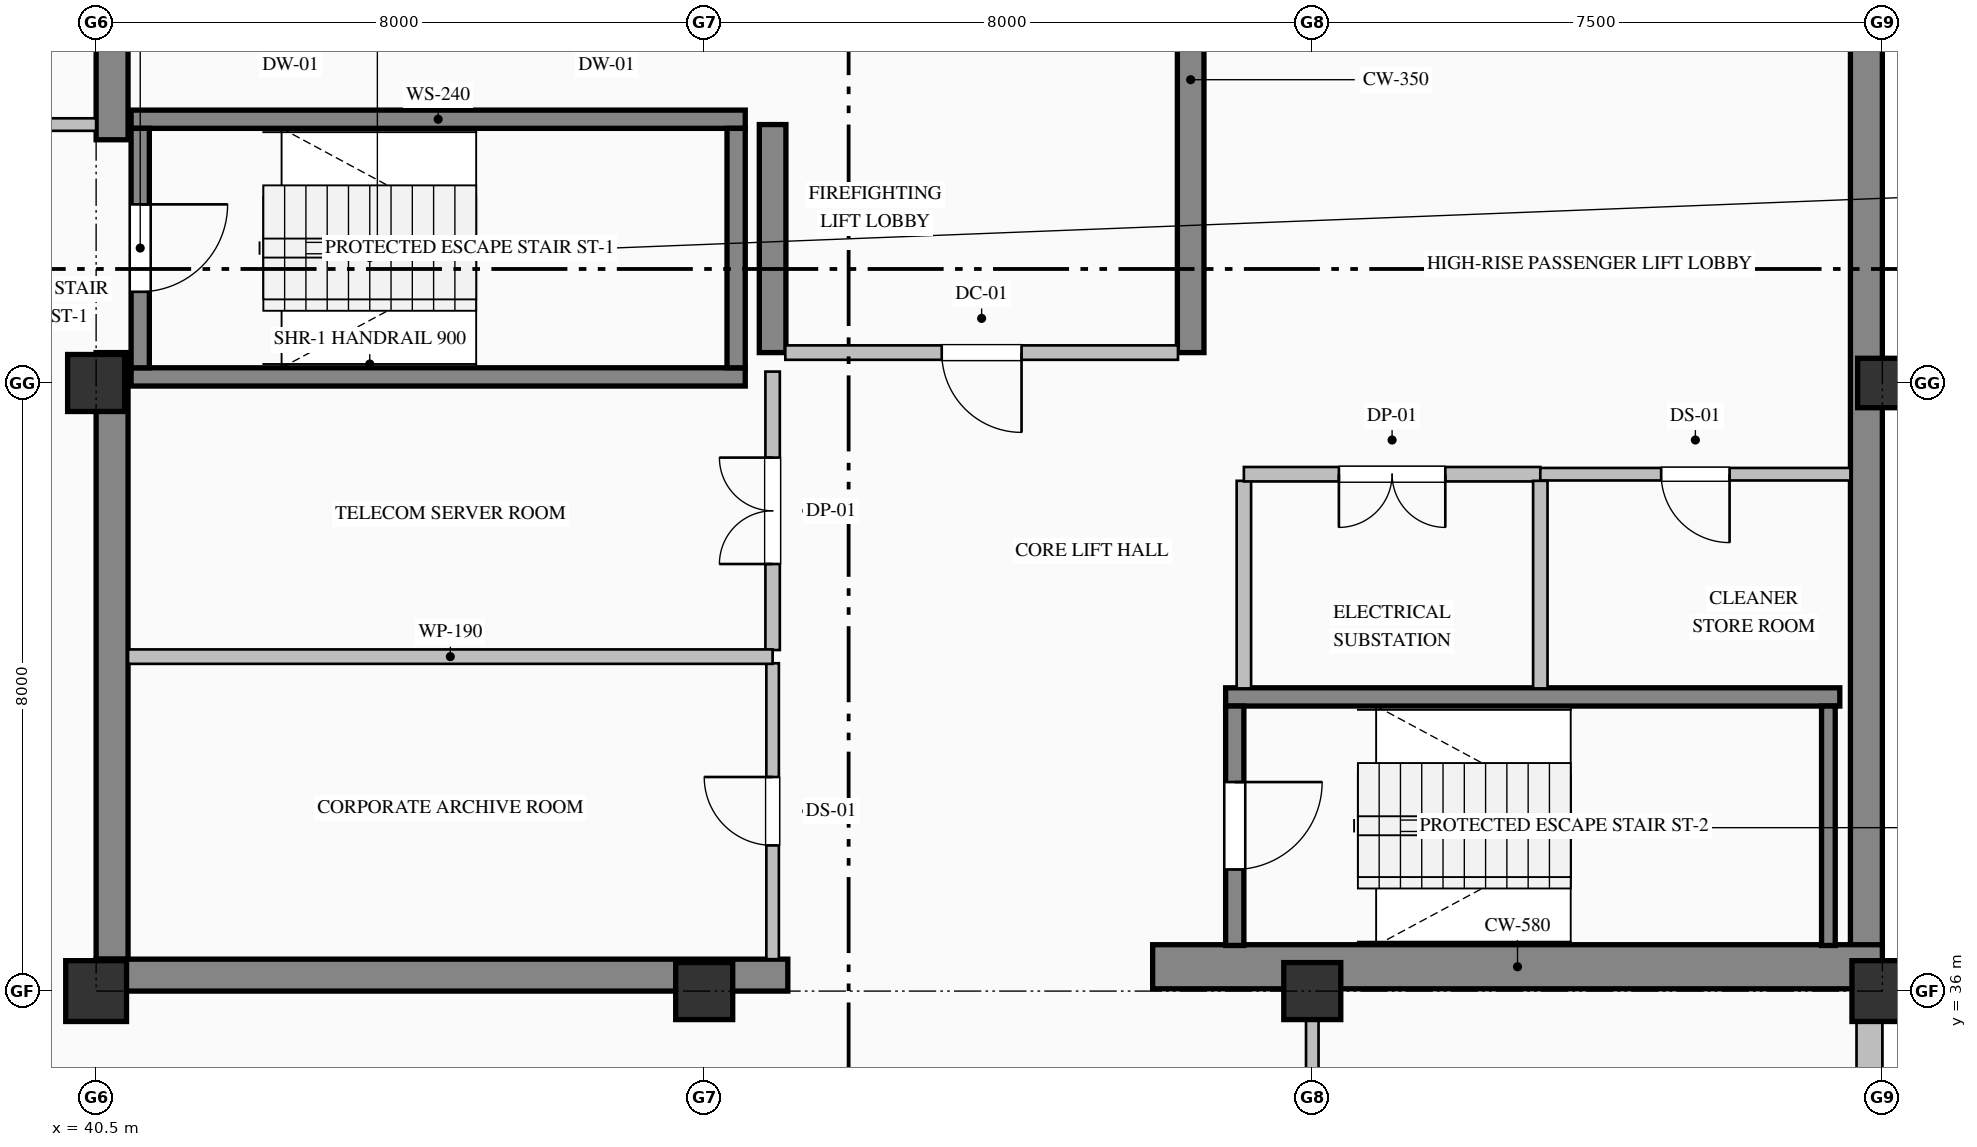
"""IFC4 building model, lengths in metres.
Left out: names, types, materials, properties, quantities, classifications, styles, units other than length and angle.
Written with IfcOpenShell. Run it as: python <this file> out.ifc"""

import sys

from ifc_helpers import new_model, si_unit, direction, frame, frame_2d, origin, origin_2d, place, context, subcontext, project, spatial, rectangle, hollow_rectangle, extrude, element, fill, save


model = new_model("IFC4")
c1 = context("Model", 3, precision=1e-05, world=origin(), true_north=direction((0.0, 1.0)))
c2 = subcontext(c1, "Body", "Model", "MODEL_VIEW")
j1 = project(units=[si_unit("LENGTHUNIT", "METRE"), si_unit("PLANEANGLEUNIT", "RADIAN")], contexts=[c1])
p1 = place(None, origin())
s1 = spatial("IfcSite", under=j1, at=p1, CompositionType="ELEMENT")
p2 = place(p1, origin())
s2 = spatial("IfcBuilding", under=s1, at=p2, CompositionType="ELEMENT")
p3 = place(p2, frame((0.0, 0.0, 347.2)))
s3 = spatial("IfcBuildingStorey", under=s2, at=p3, CompositionType="ELEMENT", Elevation=347.2)
p4 = place(p3, frame((63.79, 36.32, 0.0), z_axis=(0.0, 0.0, 1.0), x_axis=(0.0, 1.0, 0.0)))
e1 = element("IfcWall", 1, at=p4, inside=s3, PredefinedType="SHEAR", context=c2, shape_type="SweptSolid", body=[
    extrude(rectangle(XDim=15.26, YDim=0.42, at=frame_2d((7.63, 0.0))), origin(), (0.0, 0.0, 1.0), 3.785),
])
p5 = place(p3, frame((40.71, 36.42, 0.0), z_axis=(0.0, 0.0, 1.0), x_axis=(0.0, 1.0, 0.0)))
e2 = element("IfcWall", 2, at=p5, inside=s3, PredefinedType="SHEAR", context=c2, shape_type="SweptSolid", body=[
    extrude(rectangle(XDim=7.98, YDim=0.42, at=frame_2d((3.99, 0.0))), origin(), (0.0, 0.0, 1.0), 3.785),
])
p6 = place(p3, frame((40.71, 47.2, 0.0), z_axis=(0.0, 0.0, 1.0), x_axis=(0.0, 1.0, 0.0)))
e3 = element("IfcWall", 3, at=p6, inside=s3, PredefinedType="SHEAR", context=c2, shape_type="SweptSolid", body=[
    extrude(rectangle(XDim=4.38, YDim=0.42, at=frame_2d((2.19, 0.0))), origin(), (0.0, 0.0, 1.0), 3.785),
])
p7 = place(p3, frame((40.5, 36.21, 0.0), z_axis=(0.0, 0.0, 1.0), x_axis=(1.0, 0.0, 0.0)))
e4 = element("IfcWall", 4, at=p7, inside=s3, PredefinedType="SHEAR", context=c2, shape_type="SweptSolid", body=[
    extrude(rectangle(XDim=9.1, YDim=0.42, at=frame_2d((4.55, 0.0))), origin(), (0.0, 0.0, 1.0), 3.785),
])
p8 = place(p3, frame((54.4, 36.32, 0.0), z_axis=(0.0, 0.0, 1.0), x_axis=(1.0, 0.0, 0.0)))
e5 = element("IfcWall", 5, at=p8, inside=s3, PredefinedType="SHEAR", context=c2, shape_type="SweptSolid", body=[
    extrude(rectangle(XDim=9.6, YDim=0.58, at=frame_2d((4.8, 0.0))), origin(), (0.0, 0.0, 1.0), 4.0),
])
p9 = place(p3, frame((49.4, 44.4, 0.0), z_axis=(0.0, 0.0, 1.0), x_axis=(0.0, 1.0, 0.0)))
e6 = element("IfcWall", 6, at=p9, inside=s3, PredefinedType="SHEAR", context=c2, shape_type="SweptSolid", body=[
    extrude(rectangle(XDim=3.0, YDim=0.35, at=frame_2d((1.5, 0.0))), origin(), (0.0, 0.0, 1.0), 3.785),
])
p10 = place(p3, frame((54.9, 44.4, 0.0), z_axis=(0.0, 0.0, 1.0), x_axis=(0.0, 1.0, 0.0)))
e7 = element("IfcWall", 7, at=p10, inside=s3, PredefinedType="SHEAR", context=c2, shape_type="SweptSolid", body=[
    extrude(rectangle(XDim=7.18, YDim=0.35, at=frame_2d((3.59, 0.0))), origin(), (0.0, 0.0, 1.0), 3.785),
])
p11 = place(p3, frame((40.5, 36.0, 0.0), z_axis=(0.0, 0.0, 1.0), x_axis=(1.0, 0.0, 0.0)))
e8 = element("IfcColumn", 8, at=p11, inside=s3, PredefinedType="COLUMN", context=c2, shape_type="SweptSolid", body=[
    extrude(hollow_rectangle(XDim=0.8, YDim=0.8, WallThickness=0.032, at=origin_2d()), origin(), (0.0, 0.0, 1.0), 4.0),
])
for number, where, z_axis, x_axis in (
    (9, (40.5, 44.0, 0.0), (0.0, 0.0, 1.0), (1.0, 0.0, 0.0)),
    (10, (48.5, 36.0, 0.0), (0.0, 0.0, 1.0), (1.0, 0.0, 0.0)),
    (11, (56.5, 36.0, 0.0), (0.0, 0.0, 1.0), (1.0, 0.0, 0.0)),
):
    element("IfcColumn", number, at=place(p3, frame(where, z_axis=z_axis, x_axis=x_axis)), inside=s3, PredefinedType="COLUMN", context=c2, shape_type="SweptSolid", body=[
        extrude(rectangle(XDim=0.75, YDim=0.75, at=origin_2d()), origin(), (0.0, 0.0, 1.0), 4.0),
    ])
p12 = place(p3, frame((64.0, 36.0, 0.0), z_axis=(0.0, 0.0, 1.0), x_axis=(1.0, 0.0, 0.0)))
e12 = element("IfcColumn", 12, at=p12, inside=s3, PredefinedType="COLUMN", context=c2, shape_type="SweptSolid", body=[
    extrude(hollow_rectangle(XDim=0.8, YDim=0.8, WallThickness=0.032, at=origin_2d()), origin(), (0.0, 0.0, 1.0), 4.0),
])
p13 = place(p3, frame((64.0, 44.0, 0.0), z_axis=(0.0, 0.0, 1.0), x_axis=(1.0, 0.0, 0.0)))
e13 = element("IfcColumn", 13, at=p13, inside=s3, PredefinedType="COLUMN", context=c2, shape_type="SweptSolid", body=[
    extrude(hollow_rectangle(XDim=0.65, YDim=0.65, WallThickness=0.028, at=origin_2d()), origin(), (0.0, 0.0, 1.0), 4.0),
])
p14 = place(p3, frame((63.83, 36.05, 0.0), z_axis=(0.0, 0.0, 1.0), x_axis=(0.0, -1.0, 0.0)))
e14 = element("IfcWall", 14, at=p14, inside=s3, PredefinedType="SOLIDWALL", context=c2, shape_type="SweptSolid", body=[
    extrude(rectangle(XDim=13.55, YDim=0.34, at=frame_2d((6.775, 0.0))), origin(), (0.0, 0.0, 1.0), 3.335),
])
p15 = place(p14, frame((3.125, 0.0, 0.9)))
e15 = element("IfcOpeningElement", 15, at=p15, cuts=e14, PredefinedType="OPENING", context=c2, shape_type="SweptSolid", body=[
    extrude(rectangle(XDim=0.95, YDim=1.85, at=frame_2d((0.475, 0.925))), frame((0.0, 0.18, 0.0), z_axis=(0.0, -1.0, 0.0), x_axis=(1.0, 0.0, 0.0)), (0.0, 0.0, 1.0), 0.36),
])
for number, where, z_axis, x_axis in (
    (16, (40.96, 47.47, 0.0), (0.0, 0.0, 1.0), (1.0, 0.0, 0.0)),
    (17, (49.04, 44.08, 0.0), (0.0, 0.0, 1.0), (-1.0, 0.0, 0.0)),
):
    element("IfcWall", number, at=place(p3, frame(where, z_axis=z_axis, x_axis=x_axis)), inside=s3, PredefinedType="SOLIDWALL", context=c2, shape_type="SweptSolid", body=[
        extrude(rectangle(XDim=8.08, YDim=0.24, at=frame_2d((4.04, 0.0))), origin(), (0.0, 0.0, 1.0), 4.0),
    ])
p16 = place(p3, frame((41.08, 47.35, 0.0), z_axis=(0.0, 0.0, 1.0), x_axis=(0.0, -1.0, 0.0)))
e18 = element("IfcWall", 18, at=p16, inside=s3, PredefinedType="SOLIDWALL", context=c2, shape_type="SweptSolid", body=[
    extrude(rectangle(XDim=3.15, YDim=0.24, at=frame_2d((1.575, 0.0))), origin(), (0.0, 0.0, 1.0), 4.0),
])
p17 = place(p16, frame((1.0, 0.0, 0.0)))
e19 = element("IfcOpeningElement", 19, at=p17, cuts=e18, PredefinedType="OPENING", context=c2, shape_type="SweptSolid", body=[
    extrude(rectangle(XDim=1.15, YDim=2.2, at=frame_2d((0.575, 1.1))), frame((0.0, 0.13, 0.0), z_axis=(0.0, -1.0, 0.0), x_axis=(1.0, 0.0, 0.0)), (0.0, 0.0, 1.0), 0.26),
])
p18 = place(p3, frame((48.92, 44.2, 0.0), z_axis=(0.0, 0.0, 1.0), x_axis=(0.0, 1.0, 0.0)))
e20 = element("IfcWall", 20, at=p18, inside=s3, PredefinedType="SOLIDWALL", context=c2, shape_type="SweptSolid", body=[
    extrude(rectangle(XDim=3.15, YDim=0.24, at=frame_2d((1.575, 0.0))), origin(), (0.0, 0.0, 1.0), 4.0),
])
p19 = place(p3, frame((55.36, 39.87, 0.0), z_axis=(0.0, 0.0, 1.0), x_axis=(1.0, 0.0, 0.0)))
e21 = element("IfcWall", 21, at=p19, inside=s3, PredefinedType="SOLIDWALL", context=c2, shape_type="SweptSolid", body=[
    extrude(rectangle(XDim=8.08, YDim=0.24, at=frame_2d((4.04, 0.0))), origin(), (0.0, 0.0, 1.0), 4.0),
])
p20 = place(p3, frame((55.48, 39.75, 0.0), z_axis=(0.0, 0.0, 1.0), x_axis=(0.0, -1.0, 0.0)))
e22 = element("IfcWall", 22, at=p20, inside=s3, PredefinedType="SOLIDWALL", context=c2, shape_type="SweptSolid", body=[
    extrude(rectangle(XDim=3.15, YDim=0.24, at=frame_2d((1.575, 0.0))), origin(), (0.0, 0.0, 1.0), 4.0),
])
p21 = place(p20, frame((1.0, 0.0, 0.0)))
e23 = element("IfcOpeningElement", 23, at=p21, cuts=e22, PredefinedType="OPENING", context=c2, shape_type="SweptSolid", body=[
    extrude(rectangle(XDim=1.15, YDim=2.2, at=frame_2d((0.575, 1.1))), frame((0.0, 0.13, 0.0), z_axis=(0.0, -1.0, 0.0), x_axis=(1.0, 0.0, 0.0)), (0.0, 0.0, 1.0), 0.26),
])
p22 = place(p3, frame((63.29, 36.6, 0.0), z_axis=(0.0, 0.0, 1.0), x_axis=(0.0, 1.0, 0.0)))
e24 = element("IfcWall", 24, at=p22, inside=s3, PredefinedType="SOLIDWALL", context=c2, shape_type="SweptSolid", body=[
    extrude(rectangle(XDim=3.15, YDim=0.18, at=frame_2d((1.575, 0.0))), origin(), (0.0, 0.0, 1.0), 4.0),
])
p23 = place(p3, frame((37.8, 47.4, 0.0), z_axis=(0.0, 0.0, 1.0), x_axis=(1.0, 0.0, 0.0)))
e25 = element("IfcWall", 25, at=p23, inside=s3, PredefinedType="PARTITIONING", context=c2, shape_type="SweptSolid", body=[
    extrude(rectangle(XDim=2.7, YDim=0.165, at=frame_2d((1.35, 0.0))), origin(), (0.0, 0.0, 1.0), 3.785),
])
p24 = place(p23, frame((0.825, 0.0, 0.0)))
e26 = element("IfcOpeningElement", 26, at=p24, cuts=e25, PredefinedType="OPENING", context=c2, shape_type="SweptSolid", body=[
    extrude(rectangle(XDim=1.05, YDim=2.15, at=frame_2d((0.525, 1.075))), frame((0.0, 0.093, 0.0), z_axis=(0.0, -1.0, 0.0), x_axis=(1.0, 0.0, 0.0)), (0.0, 0.0, 1.0), 0.185),
])
p25 = place(p3, frame((54.733, 44.4, 0.0), z_axis=(0.0, 0.0, 1.0), x_axis=(-1.0, 0.0, 0.0)))
e27 = element("IfcWall", 27, at=p25, inside=s3, PredefinedType="PARTITIONING", context=c2, shape_type="SweptSolid", body=[
    extrude(rectangle(XDim=5.166, YDim=0.19, at=frame_2d((2.583, 0.0))), origin(), (0.0, 0.0, 1.0), 3.785),
])
p26 = place(p25, frame((2.058, 0.0, 0.0)))
e28 = element("IfcOpeningElement", 28, at=p26, cuts=e27, PredefinedType="OPENING", context=c2, shape_type="SweptSolid", body=[
    extrude(rectangle(XDim=1.05, YDim=2.15, at=frame_2d((0.525, 1.075))), frame((0.0, 0.105, 0.0), z_axis=(0.0, -1.0, 0.0), x_axis=(1.0, 0.0, 0.0)), (0.0, 0.0, 1.0), 0.21),
])
p27 = place(p3, frame((49.4, 36.42, 0.0), z_axis=(0.0, 0.0, 1.0), x_axis=(0.0, 1.0, 0.0)))
e29 = element("IfcWall", 29, at=p27, inside=s3, PredefinedType="PARTITIONING", context=c2, shape_type="SweptSolid", body=[
    extrude(rectangle(XDim=3.893, YDim=0.165, at=frame_2d((1.947, 0.0))), origin(), (0.0, 0.0, 1.0), 3.027),
])
p28 = place(p27, frame((1.497, 0.0, 0.0)))
e30 = element("IfcOpeningElement", 30, at=p28, cuts=e29, PredefinedType="OPENING", context=c2, shape_type="SweptSolid", body=[
    extrude(rectangle(XDim=0.9, YDim=2.15, at=frame_2d((0.45, 1.075))), frame((0.0, 0.093, 0.0), z_axis=(0.0, -1.0, 0.0), x_axis=(1.0, 0.0, 0.0)), (0.0, 0.0, 1.0), 0.185),
])
p29 = place(p3, frame((49.4, 40.487, 0.0), z_axis=(0.0, 0.0, 1.0), x_axis=(0.0, 1.0, 0.0)))
e31 = element("IfcWall", 31, at=p29, inside=s3, PredefinedType="PARTITIONING", context=c2, shape_type="SweptSolid", body=[
    extrude(rectangle(XDim=3.663, YDim=0.19, at=frame_2d((1.832, 0.0))), origin(), (0.0, 0.0, 1.0), 3.027),
])
p30 = place(p29, frame((1.132, 0.0, 0.0)))
e32 = element("IfcOpeningElement", 32, at=p30, cuts=e31, PredefinedType="OPENING", context=c2, shape_type="SweptSolid", body=[
    extrude(rectangle(XDim=1.4, YDim=2.25, at=frame_2d((0.7, 1.125))), frame((0.0, 0.105, 0.0), z_axis=(0.0, -1.0, 0.0), x_axis=(1.0, 0.0, 0.0)), (0.0, 0.0, 1.0), 0.21),
])
p31 = place(p3, frame((55.6, 42.713, 0.0), z_axis=(0.0, 0.0, 1.0), x_axis=(0.0, -1.0, 0.0)))
e33 = element("IfcWall", 33, at=p31, inside=s3, PredefinedType="PARTITIONING", context=c2, shape_type="SweptSolid", body=[
    extrude(rectangle(XDim=2.731, YDim=0.19, at=frame_2d((1.365, 0.0))), origin(), (0.0, 0.0, 1.0), 3.785),
])
p32 = place(p3, frame((40.92, 40.4, 0.0), z_axis=(0.0, 0.0, 1.0), x_axis=(1.0, 0.0, 0.0)))
e34 = element("IfcWall", 34, at=p32, inside=s3, PredefinedType="PARTITIONING", context=c2, shape_type="SweptSolid", body=[
    extrude(rectangle(XDim=8.48, YDim=0.19, at=frame_2d((4.24, 0.0))), origin(), (0.0, 0.0, 1.0), 3.785),
])
p33 = place(p3, frame((59.5, 42.8, 0.0), z_axis=(0.0, 0.0, 1.0), x_axis=(-1.0, 0.0, 0.0)))
e35 = element("IfcWall", 35, at=p33, inside=s3, PredefinedType="PARTITIONING", context=c2, shape_type="SweptSolid", body=[
    extrude(rectangle(XDim=3.9, YDim=0.19, at=frame_2d((1.95, 0.0))), origin(), (0.0, 0.0, 1.0), 3.785),
])
p34 = place(p33, frame((1.25, 0.0, 0.0)))
e36 = element("IfcOpeningElement", 36, at=p34, cuts=e35, PredefinedType="OPENING", context=c2, shape_type="SweptSolid", body=[
    extrude(rectangle(XDim=1.4, YDim=2.25, at=frame_2d((0.7, 1.125))), frame((0.0, 0.105, 0.0), z_axis=(0.0, -1.0, 0.0), x_axis=(1.0, 0.0, 0.0)), (0.0, 0.0, 1.0), 0.21),
])
p35 = place(p3, frame((63.58, 42.8, 0.0), z_axis=(0.0, 0.0, 1.0), x_axis=(-1.0, 0.0, 0.0)))
e37 = element("IfcWall", 37, at=p35, inside=s3, PredefinedType="PARTITIONING", context=c2, shape_type="SweptSolid", body=[
    extrude(rectangle(XDim=4.08, YDim=0.165, at=frame_2d((2.04, 0.0))), origin(), (0.0, 0.0, 1.0), 3.785),
])
p36 = place(p35, frame((1.59, 0.0, 0.0)))
e38 = element("IfcOpeningElement", 38, at=p36, cuts=e37, PredefinedType="OPENING", context=c2, shape_type="SweptSolid", body=[
    extrude(rectangle(XDim=0.9, YDim=2.15, at=frame_2d((0.45, 1.075))), frame((0.0, 0.093, 0.0), z_axis=(0.0, -1.0, 0.0), x_axis=(1.0, 0.0, 0.0)), (0.0, 0.0, 1.0), 0.185),
])
p37 = place(p3, frame((59.5, 42.713, 0.0), z_axis=(0.0, 0.0, 1.0), x_axis=(0.0, -1.0, 0.0)))
e39 = element("IfcWall", 39, at=p37, inside=s3, PredefinedType="PARTITIONING", context=c2, shape_type="SweptSolid", body=[
    extrude(rectangle(XDim=2.731, YDim=0.19, at=frame_2d((1.365, 0.0))), origin(), (0.0, 0.0, 1.0), 3.785),
])
p38 = place(p3, frame((56.5, 36.0, 0.0), z_axis=(0.0, 0.0, 1.0), x_axis=(0.0, -1.0, 0.0)))
e40 = element("IfcWall", 40, at=p38, inside=s3, PredefinedType="PARTITIONING", context=c2, shape_type="SweptSolid", body=[
    extrude(rectangle(XDim=2.325, YDim=0.165, at=frame_2d((1.163, 0.0))), origin(), (0.0, 0.0, 1.0), 3.177),
])
p39 = place(p17, origin())
e41 = element("IfcDoor", 41, at=p39, inside=s3, OperationType="SINGLE_SWING_LEFT", PredefinedType="DOOR", context=c2, shape_type="SweptSolid", body=[
    extrude(rectangle(XDim=1.15, YDim=2.2, at=frame_2d((0.575, 1.1))), frame((0.0, 0.025, 0.0), z_axis=(0.0, -1.0, 0.0), x_axis=(1.0, 0.0, 0.0)), (0.0, 0.0, 1.0), 0.05),
])
fill(e19, e41)
p40 = place(p21, origin())
e42 = element("IfcDoor", 42, at=p40, inside=s3, OperationType="SINGLE_SWING_LEFT", PredefinedType="DOOR", context=c2, shape_type="SweptSolid", body=[
    extrude(rectangle(XDim=1.15, YDim=2.2, at=frame_2d((0.575, 1.1))), frame((0.0, 0.025, 0.0), z_axis=(0.0, -1.0, 0.0), x_axis=(1.0, 0.0, 0.0)), (0.0, 0.0, 1.0), 0.05),
])
fill(e23, e42)
p41 = place(p26, origin())
e43 = element("IfcDoor", 43, at=p41, inside=s3, OperationType="SINGLE_SWING_LEFT", PredefinedType="DOOR", context=c2, shape_type="SweptSolid", body=[
    extrude(rectangle(XDim=1.05, YDim=2.15, at=frame_2d((0.525, 1.075))), frame((0.0, 0.025, 0.0), z_axis=(0.0, -1.0, 0.0), x_axis=(1.0, 0.0, 0.0)), (0.0, 0.0, 1.0), 0.05),
])
fill(e28, e43)
p42 = place(p28, origin())
e44 = element("IfcDoor", 44, at=p42, inside=s3, OperationType="SINGLE_SWING_RIGHT", PredefinedType="DOOR", context=c2, shape_type="SweptSolid", body=[
    extrude(rectangle(XDim=0.9, YDim=2.15, at=frame_2d((0.45, 1.075))), frame((0.0, 0.025, 0.0), z_axis=(0.0, -1.0, 0.0), x_axis=(1.0, 0.0, 0.0)), (0.0, 0.0, 1.0), 0.05),
])
fill(e30, e44)
p43 = place(p30, origin())
e45 = element("IfcDoor", 45, at=p43, inside=s3, OperationType="DOUBLE_DOOR_SINGLE_SWING", PredefinedType="DOOR", context=c2, shape_type="SweptSolid", body=[
    extrude(rectangle(XDim=1.4, YDim=2.25, at=frame_2d((0.7, 1.125))), frame((0.0, 0.025, 0.0), z_axis=(0.0, -1.0, 0.0), x_axis=(1.0, 0.0, 0.0)), (0.0, 0.0, 1.0), 0.05),
])
fill(e32, e45)
p44 = place(p34, origin())
e46 = element("IfcDoor", 46, at=p44, inside=s3, OperationType="DOUBLE_DOOR_SINGLE_SWING", PredefinedType="DOOR", context=c2, shape_type="SweptSolid", body=[
    extrude(rectangle(XDim=1.4, YDim=2.25, at=frame_2d((0.7, 1.125))), frame((0.0, 0.025, 0.0), z_axis=(0.0, -1.0, 0.0), x_axis=(1.0, 0.0, 0.0)), (0.0, 0.0, 1.0), 0.05),
])
fill(e36, e46)
p45 = place(p36, origin())
e47 = element("IfcDoor", 47, at=p45, inside=s3, OperationType="SINGLE_SWING_LEFT", PredefinedType="DOOR", context=c2, shape_type="SweptSolid", body=[
    extrude(rectangle(XDim=0.9, YDim=2.15, at=frame_2d((0.45, 1.075))), frame((0.0, 0.025, 0.0), z_axis=(0.0, -1.0, 0.0), x_axis=(1.0, 0.0, 0.0)), (0.0, 0.0, 1.0), 0.05),
])
fill(e38, e47)
save(model, sys.argv[1])
